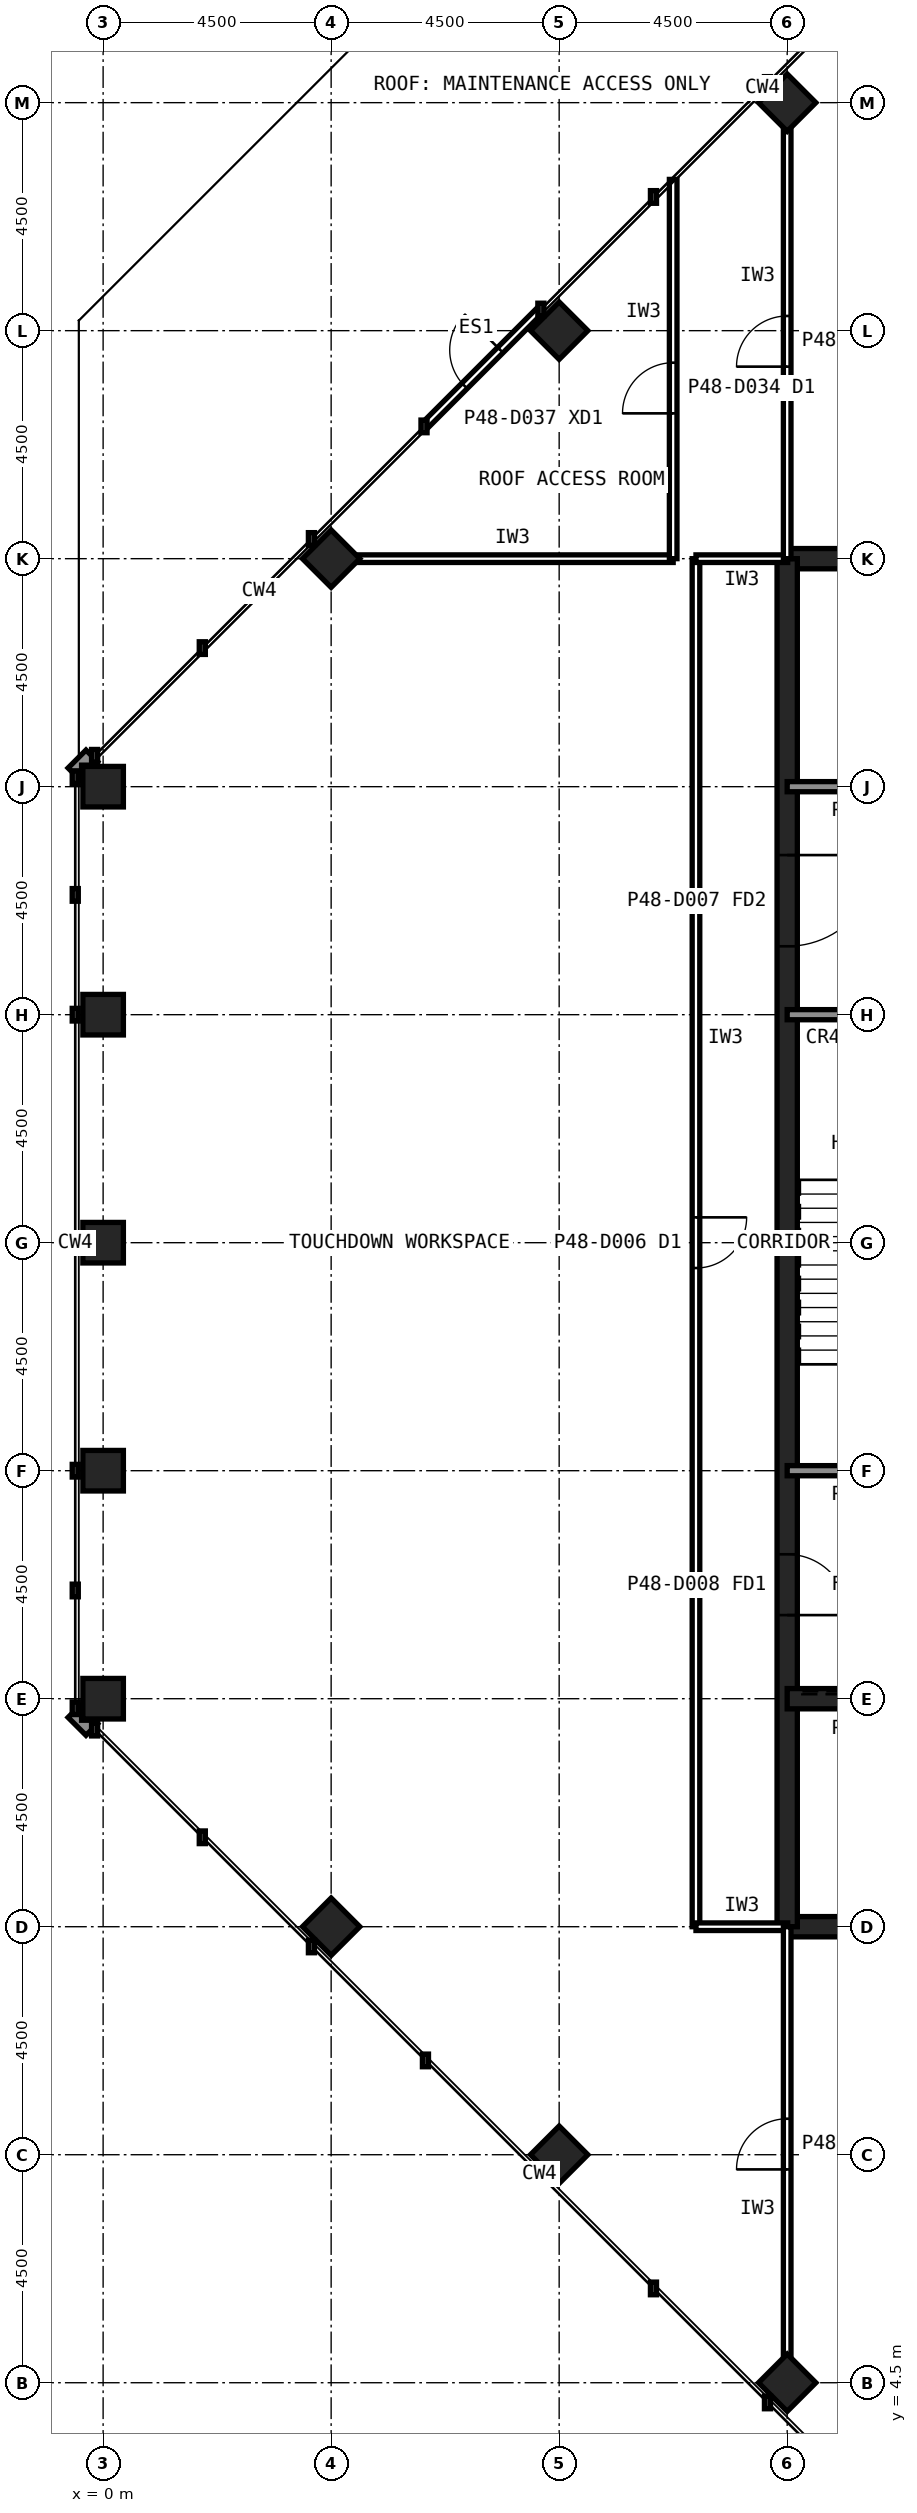
"""IFC4 building model, lengths in metres.
Left out: names, types, materials, properties, quantities, classifications, styles, units other than length and angle.
Written with IfcOpenShell. Run it as: python <this file> out.ifc"""

import sys

from ifc_helpers import new_model, si_unit, direction, frame, frame_2d, origin, origin_2d, place, context, subcontext, project, spatial, rectangle, hollow_rectangle, extrude, element, fill, save


model = new_model("IFC4")
c1 = context("Model", 3, precision=1e-05, world=origin(), true_north=direction((0.0, 1.0)))
c2 = subcontext(c1, "Body", "Model", "MODEL_VIEW")
j1 = project(units=[si_unit("LENGTHUNIT", "METRE"), si_unit("PLANEANGLEUNIT", "RADIAN")], contexts=[c1])
p1 = place(None, origin())
s1 = spatial("IfcSite", under=j1, at=p1, CompositionType="ELEMENT")
p2 = place(p1, origin())
s2 = spatial("IfcBuilding", under=s1, at=p2, CompositionType="ELEMENT")
p3 = place(p2, frame((0.0, 0.0, 205.6)))
s3 = spatial("IfcBuildingStorey", under=s2, at=p3, CompositionType="ELEMENT", Elevation=205.6)
for number, where, z_axis, x_axis in (
    (1, (0.0, 36.0, 0.0), (0.0, 0.0, 1.0), (1.0, 0.0, 0.0)),
    (2, (0.0, 31.5, 0.0), (0.0, 0.0, 1.0), (1.0, 0.0, 0.0)),
    (3, (0.0, 27.0, 0.0), (0.0, 0.0, 1.0), (1.0, 0.0, 0.0)),
    (4, (0.0, 22.5, 0.0), (0.0, 0.0, 1.0), (1.0, 0.0, 0.0)),
    (5, (0.0, 18.0, 0.0), (0.0, 0.0, 1.0), (1.0, 0.0, 0.0)),
    (6, (13.5, 4.5, 0.0), (0.0, 0.0, 1.0), (0.707, 0.707, 0.0)),
    (7, (9.0, 9.0, 0.0), (0.0, 0.0, 1.0), (0.707, 0.707, 0.0)),
    (8, (4.5, 13.5, 0.0), (0.0, 0.0, 1.0), (0.707, 0.707, 0.0)),
    (9, (4.5, 40.5, 0.0), (0.0, 0.0, 1.0), (0.707, 0.707, 0.0)),
    (10, (9.0, 45.0, 0.0), (0.0, 0.0, 1.0), (0.707, 0.707, 0.0)),
    (11, (13.5, 49.5, 0.0), (0.0, 0.0, 1.0), (0.707, 0.707, 0.0)),
):
    element("IfcColumn", number, at=place(p3, frame(where, z_axis=z_axis, x_axis=x_axis)), inside=s3, PredefinedType="COLUMN", context=c2, shape_type="SweptSolid", body=[
        extrude(hollow_rectangle(XDim=0.8, YDim=0.8, WallThickness=0.063, at=origin_2d()), origin(), (0.0, 0.0, 1.0), 5.0),
    ])
for number, where, z_axis, x_axis in (
    (12, (13.5, 13.5, 0.0), (0.0, 0.0, 1.0), (1.0, 0.0, 0.0)),
    (13, (40.5, 40.5, 0.0), (0.0, 0.0, 1.0), (-1.0, 0.0, 0.0)),
):
    element("IfcWall", number, at=place(p3, frame(where, z_axis=z_axis, x_axis=x_axis)), inside=s3, PredefinedType="SHEAR", context=c2, shape_type="SweptSolid", body=[
        extrude(rectangle(XDim=27.0, YDim=0.4, at=frame_2d((13.5, 0.0))), origin(), (0.0, 0.0, 1.0), 5.0),
    ])
p4 = place(p3, frame((13.5, 40.5, 0.0), z_axis=(0.0, 0.0, 1.0), x_axis=(0.0, -1.0, 0.0)))
e14 = element("IfcWall", 14, at=p4, inside=s3, PredefinedType="SHEAR", context=c2, shape_type="SweptSolid", body=[
    extrude(rectangle(XDim=27.0, YDim=0.4, at=frame_2d((13.5, 0.0))), origin(), (0.0, 0.0, 1.0), 5.0),
])
p5 = place(p4, frame((19.65, 0.0, 0.0)))
e15 = element("IfcOpeningElement", 15, at=p5, cuts=e14, PredefinedType="OPENING", context=c2, shape_type="SweptSolid", body=[
    extrude(rectangle(XDim=1.2, YDim=2.1, at=frame_2d((0.6, 1.05))), frame((0.0, 0.21, 0.0), z_axis=(0.0, -1.0, 0.0), x_axis=(1.0, 0.0, 0.0)), (0.0, 0.0, 1.0), 0.42),
])
p6 = place(p4, frame((5.85, 0.0, 0.0)))
e16 = element("IfcOpeningElement", 16, at=p6, cuts=e14, PredefinedType="OPENING", context=c2, shape_type="SweptSolid", body=[
    extrude(rectangle(XDim=1.8, YDim=2.1, at=frame_2d((0.9, 1.05))), frame((0.0, 0.21, 0.0), z_axis=(0.0, -1.0, 0.0), x_axis=(1.0, 0.0, 0.0)), (0.0, 0.0, 1.0), 0.42),
])
p7 = place(p3, frame((13.5, 18.0, 0.0), z_axis=(0.0, 0.0, 1.0), x_axis=(1.0, 0.0, 0.0)))
e17 = element("IfcWall", 17, at=p7, inside=s3, PredefinedType="SHEAR", context=c2, shape_type="SweptSolid", body=[
    extrude(rectangle(XDim=27.0, YDim=0.4, at=frame_2d((13.5, 0.0))), origin(), (0.0, 0.0, 1.0), 5.0),
])
p8 = place(p7, frame((24.3, 0.0, 0.0)))
e18 = element("IfcOpeningElement", 18, at=p8, cuts=e17, PredefinedType="OPENING", context=c2, shape_type="SweptSolid", body=[
    extrude(rectangle(XDim=0.9, YDim=2.1, at=frame_2d((0.45, 1.05))), frame((0.0, 0.21, 0.0), z_axis=(0.0, -1.0, 0.0), x_axis=(1.0, 0.0, 0.0)), (0.0, 0.0, 1.0), 0.42),
])
p9 = place(p7, frame((5.45, 0.0, 0.0)))
e19 = element("IfcOpeningElement", 19, at=p9, cuts=e17, PredefinedType="OPENING", context=c2, shape_type="SweptSolid", body=[
    extrude(rectangle(XDim=1.1, YDim=2.1, at=frame_2d((0.55, 1.05))), frame((0.0, 0.21, 0.0), z_axis=(0.0, -1.0, 0.0), x_axis=(1.0, 0.0, 0.0)), (0.0, 0.0, 1.0), 0.42),
])
p10 = place(p7, frame((8.45, 0.0, 0.0)))
e20 = element("IfcOpeningElement", 20, at=p10, cuts=e17, PredefinedType="OPENING", context=c2, shape_type="SweptSolid", body=[
    extrude(rectangle(XDim=1.1, YDim=2.1, at=frame_2d((0.55, 1.05))), frame((0.0, 0.21, 0.0), z_axis=(0.0, -1.0, 0.0), x_axis=(1.0, 0.0, 0.0)), (0.0, 0.0, 1.0), 0.42),
])
p11 = place(p7, frame((11.45, 0.0, 0.0)))
e21 = element("IfcOpeningElement", 21, at=p11, cuts=e17, PredefinedType="OPENING", context=c2, shape_type="SweptSolid", body=[
    extrude(rectangle(XDim=1.1, YDim=2.1, at=frame_2d((0.55, 1.05))), frame((0.0, 0.21, 0.0), z_axis=(0.0, -1.0, 0.0), x_axis=(1.0, 0.0, 0.0)), (0.0, 0.0, 1.0), 0.42),
])
p12 = place(p7, frame((14.45, 0.0, 0.0)))
e22 = element("IfcOpeningElement", 22, at=p12, cuts=e17, PredefinedType="OPENING", context=c2, shape_type="SweptSolid", body=[
    extrude(rectangle(XDim=1.1, YDim=2.1, at=frame_2d((0.55, 1.05))), frame((0.0, 0.21, 0.0), z_axis=(0.0, -1.0, 0.0), x_axis=(1.0, 0.0, 0.0)), (0.0, 0.0, 1.0), 0.42),
])
p13 = place(p7, frame((17.45, 0.0, 0.0)))
e23 = element("IfcOpeningElement", 23, at=p13, cuts=e17, PredefinedType="OPENING", context=c2, shape_type="SweptSolid", body=[
    extrude(rectangle(XDim=1.1, YDim=2.1, at=frame_2d((0.55, 1.05))), frame((0.0, 0.21, 0.0), z_axis=(0.0, -1.0, 0.0), x_axis=(1.0, 0.0, 0.0)), (0.0, 0.0, 1.0), 0.42),
])
p14 = place(p7, frame((20.45, 0.0, 0.0)))
e24 = element("IfcOpeningElement", 24, at=p14, cuts=e17, PredefinedType="OPENING", context=c2, shape_type="SweptSolid", body=[
    extrude(rectangle(XDim=1.1, YDim=2.1, at=frame_2d((0.55, 1.05))), frame((0.0, 0.21, 0.0), z_axis=(0.0, -1.0, 0.0), x_axis=(1.0, 0.0, 0.0)), (0.0, 0.0, 1.0), 0.42),
])
p15 = place(p7, frame((1.6, 0.0, 0.0)))
e25 = element("IfcOpeningElement", 25, at=p15, cuts=e17, PredefinedType="OPENING", context=c2, shape_type="SweptSolid", body=[
    extrude(rectangle(XDim=1.3, YDim=2.2, at=frame_2d((0.65, 1.1))), frame((0.0, 0.21, 0.0), z_axis=(0.0, -1.0, 0.0), x_axis=(1.0, 0.0, 0.0)), (0.0, 0.0, 1.0), 0.42),
])
p16 = place(p3, frame((13.5, 36.0, 0.0), z_axis=(0.0, 0.0, 1.0), x_axis=(1.0, 0.0, 0.0)))
e26 = element("IfcWall", 26, at=p16, inside=s3, PredefinedType="SOLIDWALL", context=c2, shape_type="SweptSolid", body=[
    extrude(rectangle(XDim=27.0, YDim=0.2, at=frame_2d((13.5, 0.0))), origin(), (0.0, 0.0, 1.0), 4.84),
])
p17 = place(p16, frame((1.8, 0.0, 0.0)))
e27 = element("IfcOpeningElement", 27, at=p17, cuts=e26, PredefinedType="OPENING", context=c2, shape_type="SweptSolid", body=[
    extrude(rectangle(XDim=0.9, YDim=2.1, at=frame_2d((0.45, 1.05))), frame((0.0, 0.11, 0.0), z_axis=(0.0, -1.0, 0.0), x_axis=(1.0, 0.0, 0.0)), (0.0, 0.0, 1.0), 0.22),
])
p18 = place(p16, frame((5.55, 0.0, 0.0)))
e28 = element("IfcOpeningElement", 28, at=p18, cuts=e26, PredefinedType="OPENING", context=c2, shape_type="SweptSolid", body=[
    extrude(rectangle(XDim=0.9, YDim=2.1, at=frame_2d((0.45, 1.05))), frame((0.0, 0.11, 0.0), z_axis=(0.0, -1.0, 0.0), x_axis=(1.0, 0.0, 0.0)), (0.0, 0.0, 1.0), 0.22),
])
p19 = place(p16, frame((14.35, 0.0, 0.0)))
e29 = element("IfcOpeningElement", 29, at=p19, cuts=e26, PredefinedType="OPENING", context=c2, shape_type="SweptSolid", body=[
    extrude(rectangle(XDim=1.3, YDim=2.2, at=frame_2d((0.65, 1.1))), frame((0.0, 0.11, 0.0), z_axis=(0.0, -1.0, 0.0), x_axis=(1.0, 0.0, 0.0)), (0.0, 0.0, 1.0), 0.22),
])
p20 = place(p16, frame((17.35, 0.0, 0.0)))
e30 = element("IfcOpeningElement", 30, at=p20, cuts=e26, PredefinedType="OPENING", context=c2, shape_type="SweptSolid", body=[
    extrude(rectangle(XDim=1.3, YDim=2.2, at=frame_2d((0.65, 1.1))), frame((0.0, 0.11, 0.0), z_axis=(0.0, -1.0, 0.0), x_axis=(1.0, 0.0, 0.0)), (0.0, 0.0, 1.0), 0.22),
])
p21 = place(p16, frame((20.35, 0.0, 0.0)))
e31 = element("IfcOpeningElement", 31, at=p21, cuts=e26, PredefinedType="OPENING", context=c2, shape_type="SweptSolid", body=[
    extrude(rectangle(XDim=1.3, YDim=2.2, at=frame_2d((0.65, 1.1))), frame((0.0, 0.11, 0.0), z_axis=(0.0, -1.0, 0.0), x_axis=(1.0, 0.0, 0.0)), (0.0, 0.0, 1.0), 0.22),
])
p22 = place(p16, frame((24.1, 0.0, 0.0)))
e32 = element("IfcOpeningElement", 32, at=p22, cuts=e26, PredefinedType="OPENING", context=c2, shape_type="SweptSolid", body=[
    extrude(rectangle(XDim=1.3, YDim=2.2, at=frame_2d((0.65, 1.1))), frame((0.0, 0.11, 0.0), z_axis=(0.0, -1.0, 0.0), x_axis=(1.0, 0.0, 0.0)), (0.0, 0.0, 1.0), 0.22),
])
p23 = place(p3, frame((13.5, 22.5, 0.0), z_axis=(0.0, 0.0, 1.0), x_axis=(1.0, 0.0, 0.0)))
e33 = element("IfcWall", 33, at=p23, inside=s3, PredefinedType="SOLIDWALL", context=c2, shape_type="SweptSolid", body=[
    extrude(rectangle(XDim=27.0, YDim=0.2, at=frame_2d((13.5, 0.0))), origin(), (0.0, 0.0, 1.0), 4.84),
])
p24 = place(p23, frame((1.65, 0.0, 0.0)))
e34 = element("IfcOpeningElement", 34, at=p24, cuts=e33, PredefinedType="OPENING", context=c2, shape_type="SweptSolid", body=[
    extrude(rectangle(XDim=1.2, YDim=2.1, at=frame_2d((0.6, 1.05))), frame((0.0, 0.11, 0.0), z_axis=(0.0, -1.0, 0.0), x_axis=(1.0, 0.0, 0.0)), (0.0, 0.0, 1.0), 0.22),
])
p25 = place(p23, frame((6.025, 0.0, 0.0)))
e35 = element("IfcOpeningElement", 35, at=p25, cuts=e33, PredefinedType="OPENING", context=c2, shape_type="SweptSolid", body=[
    extrude(rectangle(XDim=1.0, YDim=2.1, at=frame_2d((0.5, 1.05))), frame((0.0, 0.11, 0.0), z_axis=(0.0, -1.0, 0.0), x_axis=(1.0, 0.0, 0.0)), (0.0, 0.0, 1.0), 0.22),
])
p26 = place(p23, frame((10.525, 0.0, 0.0)))
e36 = element("IfcOpeningElement", 36, at=p26, cuts=e33, PredefinedType="OPENING", context=c2, shape_type="SweptSolid", body=[
    extrude(rectangle(XDim=1.0, YDim=2.1, at=frame_2d((0.5, 1.05))), frame((0.0, 0.11, 0.0), z_axis=(0.0, -1.0, 0.0), x_axis=(1.0, 0.0, 0.0)), (0.0, 0.0, 1.0), 0.22),
])
p27 = place(p23, frame((19.75, 0.0, 0.0)))
e37 = element("IfcOpeningElement", 37, at=p27, cuts=e33, PredefinedType="OPENING", context=c2, shape_type="SweptSolid", body=[
    extrude(rectangle(XDim=1.0, YDim=2.1, at=frame_2d((0.5, 1.05))), frame((0.0, 0.11, 0.0), z_axis=(0.0, -1.0, 0.0), x_axis=(1.0, 0.0, 0.0)), (0.0, 0.0, 1.0), 0.22),
])
p28 = place(p23, frame((15.05, 0.0, 0.0)))
e38 = element("IfcOpeningElement", 38, at=p28, cuts=e33, PredefinedType="OPENING", context=c2, shape_type="SweptSolid", body=[
    extrude(rectangle(XDim=1.4, YDim=2.4, at=frame_2d((0.7, 1.2))), frame((0.0, 0.11, 0.0), z_axis=(0.0, -1.0, 0.0), x_axis=(1.0, 0.0, 0.0)), (0.0, 0.0, 1.0), 0.22),
])
p29 = place(p3, frame((13.5, 31.5, 0.0), z_axis=(0.0, 0.0, 1.0), x_axis=(1.0, 0.0, 0.0)))
e39 = element("IfcWall", 39, at=p29, inside=s3, PredefinedType="SOLIDWALL", context=c2, shape_type="SweptSolid", body=[
    extrude(rectangle(XDim=27.0, YDim=0.2, at=frame_2d((13.5, 0.0))), origin(), (0.0, 0.0, 1.0), 4.84),
])
p30 = place(p29, frame((24.15, 0.0, 0.0)))
e40 = element("IfcOpeningElement", 40, at=p30, cuts=e39, PredefinedType="OPENING", context=c2, shape_type="SweptSolid", body=[
    extrude(rectangle(XDim=1.2, YDim=2.1, at=frame_2d((0.6, 1.05))), frame((0.0, 0.11, 0.0), z_axis=(0.0, -1.0, 0.0), x_axis=(1.0, 0.0, 0.0)), (0.0, 0.0, 1.0), 0.22),
])
p31 = place(p29, frame((15.3, 0.0, 0.0)))
e41 = element("IfcOpeningElement", 41, at=p31, cuts=e39, PredefinedType="OPENING", context=c2, shape_type="SweptSolid", body=[
    extrude(rectangle(XDim=0.9, YDim=2.1, at=frame_2d((0.45, 1.05))), frame((0.0, 0.11, 0.0), z_axis=(0.0, -1.0, 0.0), x_axis=(1.0, 0.0, 0.0)), (0.0, 0.0, 1.0), 0.22),
])
p32 = place(p29, frame((19.8, 0.0, 0.0)))
e42 = element("IfcOpeningElement", 42, at=p32, cuts=e39, PredefinedType="OPENING", context=c2, shape_type="SweptSolid", body=[
    extrude(rectangle(XDim=0.9, YDim=2.1, at=frame_2d((0.45, 1.05))), frame((0.0, 0.11, 0.0), z_axis=(0.0, -1.0, 0.0), x_axis=(1.0, 0.0, 0.0)), (0.0, 0.0, 1.0), 0.22),
])
p33 = place(p3, frame((6.361, 43.139, 0.0), z_axis=(0.0, 0.0, 1.0), x_axis=(0.707106781187, 0.707106781187, 0.0)))
e43 = element("IfcWall", 43, at=p33, inside=s3, PredefinedType="USERDEFINED", context=c2, shape_type="SweptSolid", body=[
    extrude(rectangle(XDim=3.182, YDim=0.15, at=frame_2d((1.591, 0.0))), origin(), (0.0, 0.0, 1.0), 5.0),
])
p34 = place(p33, frame((1.091, 0.0, 0.0)))
e44 = element("IfcOpeningElement", 44, at=p34, cuts=e43, PredefinedType="OPENING", context=c2, shape_type="SweptSolid", body=[
    extrude(rectangle(XDim=1.0, YDim=2.1, at=frame_2d((0.5, 1.05))), frame((0.0, 0.085, 0.0), z_axis=(0.0, -1.0, 0.0), x_axis=(1.0, 0.0, 0.0)), (0.0, 0.0, 1.0), 0.17),
])
p35 = place(p3, frame((11.7, 40.5, 0.0), z_axis=(0.0, 0.0, 1.0), x_axis=(0.0, -1.0, 0.0)))
e45 = element("IfcWall", 45, at=p35, inside=s3, PredefinedType="PARTITIONING", context=c2, shape_type="SweptSolid", body=[
    extrude(rectangle(XDim=27.0, YDim=0.15, at=frame_2d((13.5, 0.0))), origin(), (0.0, 0.0, 1.0), 4.84),
])
p36 = place(p35, frame((13.0, 0.0, 0.0)))
e46 = element("IfcOpeningElement", 46, at=p36, cuts=e45, PredefinedType="OPENING", context=c2, shape_type="SweptSolid", body=[
    extrude(rectangle(XDim=1.0, YDim=2.1, at=frame_2d((0.5, 1.05))), frame((0.0, 0.085, 0.0), z_axis=(0.0, -1.0, 0.0), x_axis=(1.0, 0.0, 0.0)), (0.0, 0.0, 1.0), 0.17),
])
for number, where, z_axis, x_axis in (
    (47, (11.7, 13.5, 0.0), (0.0, 0.0, 1.0), (1.0, 0.0, 0.0)),
    (48, (13.51, 40.5, 0.0), (0.0, 0.0, 1.0), (-1.0, 0.0, 0.0)),
):
    element("IfcWall", number, at=place(p3, frame(where, z_axis=z_axis, x_axis=x_axis)), inside=s3, PredefinedType="PARTITIONING", context=c2, shape_type="SweptSolid", body=[
        extrude(rectangle(XDim=1.81, YDim=0.15, at=frame_2d((0.905, 0.0))), origin(), (0.0, 0.0, 1.0), 3.989),
    ])
p37 = place(p3, frame((4.91, 40.5, 0.0), z_axis=(0.0, 0.0, 1.0), x_axis=(1.0, 0.0, 0.0)))
e49 = element("IfcWall", 49, at=p37, inside=s3, PredefinedType="PARTITIONING", context=c2, shape_type="SweptSolid", body=[
    extrude(rectangle(XDim=6.34, YDim=0.15, at=frame_2d((3.17, 0.0))), origin(), (0.0, 0.0, 1.0), 3.989),
])
p38 = place(p3, frame((11.25, 40.5, 0.0), z_axis=(0.0, 0.0, 1.0), x_axis=(0.0, 1.0, 0.0)))
e50 = element("IfcWall", 50, at=p38, inside=s3, PredefinedType="PARTITIONING", context=c2, shape_type="SweptSolid", body=[
    extrude(rectangle(XDim=7.485, YDim=0.15, at=frame_2d((3.743, 0.0))), origin(), (0.0, 0.0, 1.0), 4.84),
])
p39 = place(p38, frame((2.868, 0.0, 0.0)))
e51 = element("IfcOpeningElement", 51, at=p39, cuts=e50, PredefinedType="OPENING", context=c2, shape_type="SweptSolid", body=[
    extrude(rectangle(XDim=1.0, YDim=2.1, at=frame_2d((0.5, 1.05))), frame((0.0, 0.085, 0.0), z_axis=(0.0, -1.0, 0.0), x_axis=(1.0, 0.0, 0.0)), (0.0, 0.0, 1.0), 0.17),
])
p40 = place(p3, frame((13.5, 40.5, 0.0), z_axis=(0.0, 0.0, 1.0), x_axis=(0.0, 1.0, 0.0)))
e52 = element("IfcWall", 52, at=p40, inside=s3, PredefinedType="PARTITIONING", context=c2, shape_type="SweptSolid", body=[
    extrude(rectangle(XDim=8.58, YDim=0.15, at=frame_2d((4.29, 0.0))), origin(), (0.0, 0.0, 1.0), 3.989),
])
p41 = place(p40, frame((3.79, 0.0, 0.0)))
e53 = element("IfcOpeningElement", 53, at=p41, cuts=e52, PredefinedType="OPENING", context=c2, shape_type="SweptSolid", body=[
    extrude(rectangle(XDim=1.0, YDim=2.1, at=frame_2d((0.5, 1.05))), frame((0.0, 0.085, 0.0), z_axis=(0.0, -1.0, 0.0), x_axis=(1.0, 0.0, 0.0)), (0.0, 0.0, 1.0), 0.17),
])
p42 = place(p3, frame((13.5, 4.92, 0.0), z_axis=(0.0, 0.0, 1.0), x_axis=(0.0, 1.0, 0.0)))
e54 = element("IfcWall", 54, at=p42, inside=s3, PredefinedType="PARTITIONING", context=c2, shape_type="SweptSolid", body=[
    extrude(rectangle(XDim=8.58, YDim=0.15, at=frame_2d((4.29, 0.0))), origin(), (0.0, 0.0, 1.0), 3.989),
])
p43 = place(p42, frame((3.79, 0.0, 0.0)))
e55 = element("IfcOpeningElement", 55, at=p43, cuts=e54, PredefinedType="OPENING", context=c2, shape_type="SweptSolid", body=[
    extrude(rectangle(XDim=1.0, YDim=2.1, at=frame_2d((0.5, 1.05))), frame((0.0, 0.085, 0.0), z_axis=(0.0, -1.0, 0.0), x_axis=(1.0, 0.0, 0.0)), (0.0, 0.0, 1.0), 0.17),
])
p44 = place(p34, origin())
e56 = element("IfcDoor", 56, at=p44, inside=s3, OperationType="SINGLE_SWING_RIGHT", PredefinedType="DOOR", context=c2, shape_type="SweptSolid", body=[
    extrude(rectangle(XDim=1.0, YDim=2.1, at=frame_2d((0.5, 1.05))), frame((0.0, 0.025, 0.0), z_axis=(0.0, -1.0, 0.0), x_axis=(1.0, 0.0, 0.0)), (0.0, 0.0, 1.0), 0.05),
])
fill(e44, e56)
p45 = place(p5, origin())
e57 = element("IfcDoor", 57, at=p45, inside=s3, OperationType="SINGLE_SWING_RIGHT", PredefinedType="DOOR", context=c2, shape_type="SweptSolid", body=[
    extrude(rectangle(XDim=1.2, YDim=2.1, at=frame_2d((0.6, 1.05))), frame((0.0, 0.025, 0.0), z_axis=(0.0, -1.0, 0.0), x_axis=(1.0, 0.0, 0.0)), (0.0, 0.0, 1.0), 0.05),
])
fill(e15, e57)
p46 = place(p6, origin())
e58 = element("IfcDoor", 58, at=p46, inside=s3, OperationType="SINGLE_SWING_LEFT", PredefinedType="DOOR", context=c2, shape_type="SweptSolid", body=[
    extrude(rectangle(XDim=1.8, YDim=2.1, at=frame_2d((0.9, 1.05))), frame((0.0, 0.025, 0.0), z_axis=(0.0, -1.0, 0.0), x_axis=(1.0, 0.0, 0.0)), (0.0, 0.0, 1.0), 0.05),
])
fill(e16, e58)
p47 = place(p36, origin())
e59 = element("IfcDoor", 59, at=p47, inside=s3, OperationType="SINGLE_SWING_LEFT", PredefinedType="DOOR", context=c2, shape_type="SweptSolid", body=[
    extrude(rectangle(XDim=1.0, YDim=2.1, at=frame_2d((0.5, 1.05))), frame((0.0, 0.025, 0.0), z_axis=(0.0, -1.0, 0.0), x_axis=(1.0, 0.0, 0.0)), (0.0, 0.0, 1.0), 0.05),
])
fill(e46, e59)
p48 = place(p39, origin())
e60 = element("IfcDoor", 60, at=p48, inside=s3, OperationType="SINGLE_SWING_LEFT", PredefinedType="DOOR", context=c2, shape_type="SweptSolid", body=[
    extrude(rectangle(XDim=1.0, YDim=2.1, at=frame_2d((0.5, 1.05))), frame((0.0, 0.025, 0.0), z_axis=(0.0, -1.0, 0.0), x_axis=(1.0, 0.0, 0.0)), (0.0, 0.0, 1.0), 0.05),
])
fill(e51, e60)
p49 = place(p41, origin())
e61 = element("IfcDoor", 61, at=p49, inside=s3, OperationType="SINGLE_SWING_LEFT", PredefinedType="DOOR", context=c2, shape_type="SweptSolid", body=[
    extrude(rectangle(XDim=1.0, YDim=2.1, at=frame_2d((0.5, 1.05))), frame((0.0, 0.025, 0.0), z_axis=(0.0, -1.0, 0.0), x_axis=(1.0, 0.0, 0.0)), (0.0, 0.0, 1.0), 0.05),
])
fill(e53, e61)
p50 = place(p43, origin())
e62 = element("IfcDoor", 62, at=p50, inside=s3, OperationType="SINGLE_SWING_LEFT", PredefinedType="DOOR", context=c2, shape_type="SweptSolid", body=[
    extrude(rectangle(XDim=1.0, YDim=2.1, at=frame_2d((0.5, 1.05))), frame((0.0, 0.025, 0.0), z_axis=(0.0, -1.0, 0.0), x_axis=(1.0, 0.0, 0.0)), (0.0, 0.0, 1.0), 0.05),
])
fill(e55, e62)
save(model, sys.argv[1])
